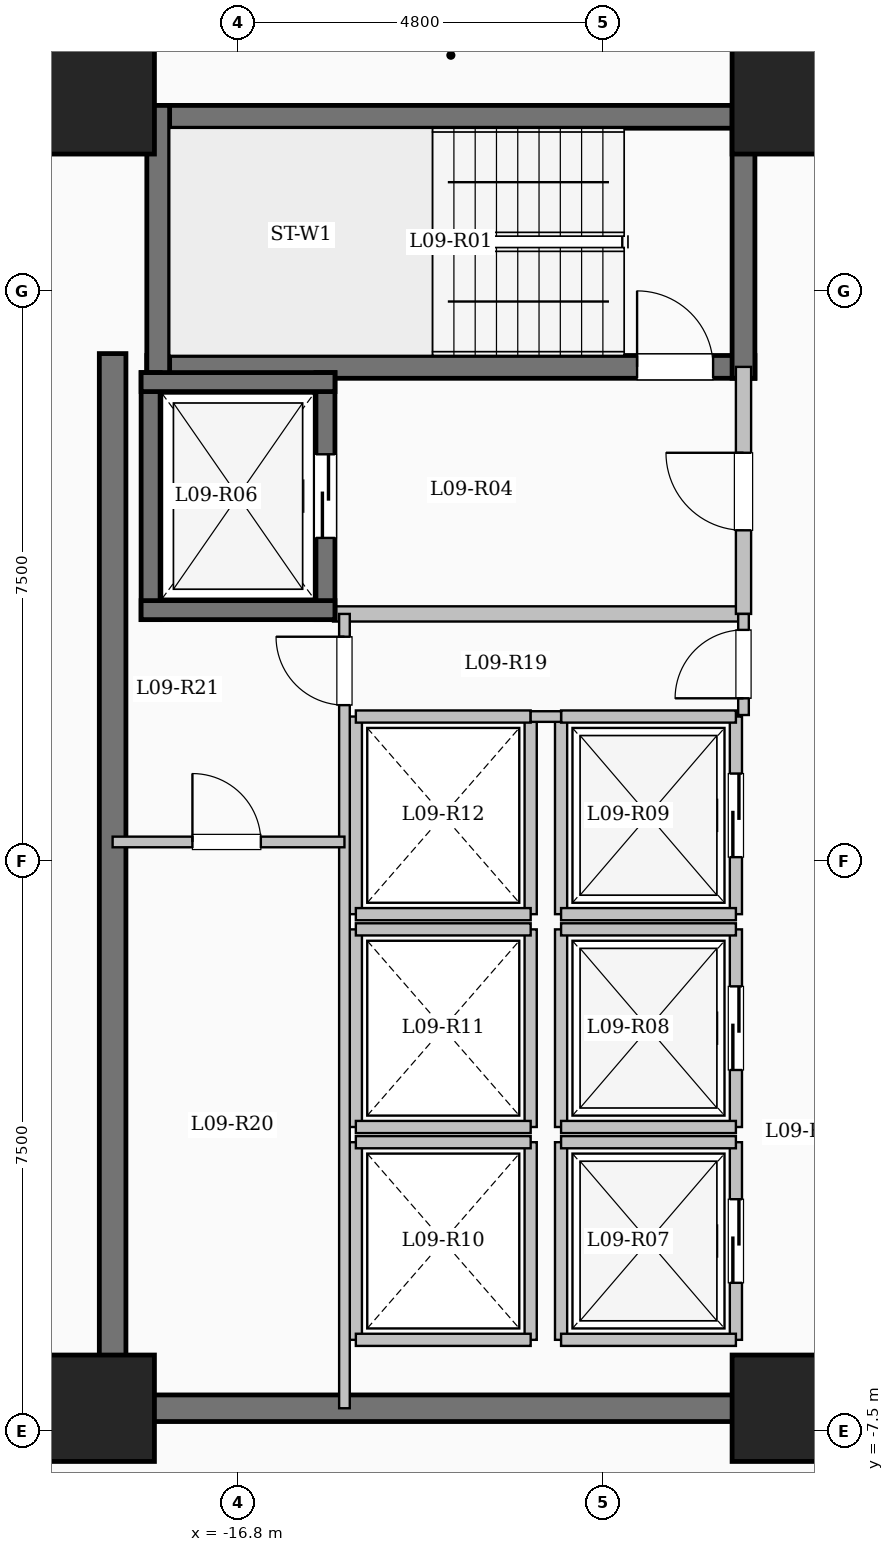
"""IFC4 building model, lengths in metres.
Left out: names, types, materials, properties, quantities, classifications, styles, units other than length and angle.
Written with IfcOpenShell. Run it as: python <this file> out.ifc"""

import sys

from ifc_helpers import new_model, si_unit, direction, frame, frame_2d, origin, origin_2d, place, context, subcontext, project, spatial, rectangle, extrude, element, fill, save


model = new_model("IFC4")
c1 = context("Model", 3, precision=1e-05, world=origin(), true_north=direction((0.0, 1.0)))
c2 = subcontext(c1, "Body", "Model", "MODEL_VIEW")
j1 = project(units=[si_unit("LENGTHUNIT", "METRE"), si_unit("PLANEANGLEUNIT", "RADIAN")], contexts=[c1])
p1 = place(None, origin())
s1 = spatial("IfcSite", under=j1, at=p1, CompositionType="ELEMENT")
p2 = place(p1, origin())
s2 = spatial("IfcBuilding", under=s1, at=p2, CompositionType="ELEMENT")
p3 = place(p2, frame((0.0, 0.0, 37.4)))
s3 = spatial("IfcBuildingStorey", under=s2, at=p3, CompositionType="ELEMENT", Elevation=37.4)
for number, where, z_axis, x_axis in (
    (1, (-9.6, -7.2, 0.0), (0.0, 0.0, 1.0), (1.0, 0.0, 0.0)),
    (2, (-9.6, 10.0, 0.0), (0.0, 0.0, 1.0), (1.0, 0.0, 0.0)),
    (3, (-18.6, -7.2, 0.0), (0.0, 0.0, 1.0), (1.0, 0.0, 0.0)),
    (4, (-18.6, 10.0, 0.0), (0.0, 0.0, 1.0), (1.0, 0.0, 0.0)),
):
    element("IfcColumn", number, at=place(p3, frame(where, z_axis=z_axis, x_axis=x_axis)), inside=s3, PredefinedType="COLUMN", context=c2, shape_type="SweptSolid", body=[
        extrude(rectangle(XDim=1.4, YDim=1.4, at=origin_2d()), origin(), (0.0, 0.0, 1.0), 3.35),
    ])
p4 = place(p3, frame((-18.0, 9.79, 0.0), z_axis=(0.0, 0.0, 1.0), x_axis=(1.0, 0.0, 0.0)))
e5 = element("IfcWall", 5, at=p4, inside=s3, PredefinedType="SHEAR", context=c2, shape_type="SweptSolid", body=[
    extrude(rectangle(XDim=8.0, YDim=0.3, at=frame_2d((4.0, 0.0))), origin(), (0.0, 0.0, 1.0), 3.35),
])
p5 = place(p3, frame((-18.0, 6.5, 0.0), z_axis=(0.0, 0.0, 1.0), x_axis=(1.0, 0.0, 0.0)))
e6 = element("IfcWall", 6, at=p5, inside=s3, PredefinedType="SHEAR", context=c2, shape_type="SweptSolid", body=[
    extrude(rectangle(XDim=8.0, YDim=0.3, at=frame_2d((4.0, 0.0))), origin(), (0.0, 0.0, 1.0), 3.35),
])
p6 = place(p5, frame((6.45, 0.0, 0.0)))
e7 = element("IfcOpeningElement", 7, at=p6, cuts=e6, PredefinedType="OPENING", context=c2, shape_type="SweptSolid", body=[
    extrude(rectangle(XDim=1.0, YDim=2.15, at=frame_2d((0.5, 1.075))), frame((0.0, 0.16, 0.0), z_axis=(0.0, -1.0, 0.0), x_axis=(1.0, 0.0, 0.0)), (0.0, 0.0, 1.0), 0.32),
])
for number, where, z_axis, x_axis in (
    (8, (-17.85, 6.35, 0.0), (0.0, 0.0, 1.0), (0.0, 1.0, 0.0)),
    (9, (-10.15, 6.35, 0.0), (0.0, 0.0, 1.0), (0.0, 1.0, 0.0)),
):
    element("IfcWall", number, at=place(p3, frame(where, z_axis=z_axis, x_axis=x_axis)), inside=s3, PredefinedType="SHEAR", context=c2, shape_type="SweptSolid", body=[
        extrude(rectangle(XDim=3.59, YDim=0.3, at=frame_2d((1.795, 0.0))), origin(), (0.0, 0.0, 1.0), 3.35),
    ])
p7 = place(p3, frame((-15.55, 3.25, 0.0), z_axis=(0.0, 0.0, 1.0), x_axis=(1.0, 0.0, 0.0)))
e10 = element("IfcWall", 10, at=p7, inside=s3, PredefinedType="SOLIDWALL", context=c2, shape_type="SweptSolid", body=[
    extrude(rectangle(XDim=5.4, YDim=0.2, at=frame_2d((2.7, 0.0))), origin(), (0.0, 0.0, 1.0), 3.1),
])
p8 = place(p3, frame((-10.15, 3.25, 0.0), z_axis=(0.0, 0.0, 1.0), x_axis=(0.0, 1.0, 0.0)))
e11 = element("IfcWall", 11, at=p8, inside=s3, PredefinedType="SOLIDWALL", context=c2, shape_type="SweptSolid", body=[
    extrude(rectangle(XDim=3.25, YDim=0.2, at=frame_2d((1.625, 0.0))), origin(), (0.0, 0.0, 1.0), 3.1),
])
p9 = place(p8, frame((1.1, 0.0, 0.0)))
e12 = element("IfcOpeningElement", 12, at=p9, cuts=e11, PredefinedType="OPENING", context=c2, shape_type="SweptSolid", body=[
    extrude(rectangle(XDim=1.02, YDim=2.15, at=frame_2d((0.51, 1.075))), frame((0.0, 0.11, 0.0), z_axis=(0.0, -1.0, 0.0), x_axis=(1.0, 0.0, 0.0)), (0.0, 0.0, 1.0), 0.22),
])
p10 = place(p3, frame((-17.95, 3.175, 0.0), z_axis=(0.0, 0.0, 1.0), x_axis=(0.0, 1.0, 0.0)))
e13 = element("IfcWall", 13, at=p10, inside=s3, PredefinedType="SHEAR", context=c2, shape_type="SweptSolid", body=[
    extrude(rectangle(XDim=3.25, YDim=0.25, at=frame_2d((1.625, 0.0))), origin(), (0.0, 0.0, 1.0), 3.35),
])
p11 = place(p3, frame((-15.65, 3.175, 0.0), z_axis=(0.0, 0.0, 1.0), x_axis=(0.0, 1.0, 0.0)))
e14 = element("IfcWall", 14, at=p11, inside=s3, PredefinedType="SHEAR", context=c2, shape_type="SweptSolid", body=[
    extrude(rectangle(XDim=3.25, YDim=0.25, at=frame_2d((1.625, 0.0))), origin(), (0.0, 0.0, 1.0), 3.35),
])
p12 = place(p11, frame((1.075, 0.0, 0.0)))
e15 = element("IfcOpeningElement", 15, at=p12, cuts=e14, PredefinedType="OPENING", context=c2, shape_type="SweptSolid", body=[
    extrude(rectangle(XDim=1.1, YDim=2.15, at=frame_2d((0.55, 1.075))), frame((0.0, 0.135, 0.0), z_axis=(0.0, -1.0, 0.0), x_axis=(1.0, 0.0, 0.0)), (0.0, 0.0, 1.0), 0.27),
])
for number, where, z_axis, x_axis in (
    (16, (-18.075, 3.3, 0.0), (0.0, 0.0, 1.0), (1.0, 0.0, 0.0)),
    (17, (-18.075, 6.3, 0.0), (0.0, 0.0, 1.0), (1.0, 0.0, 0.0)),
):
    element("IfcWall", number, at=place(p3, frame(where, z_axis=z_axis, x_axis=x_axis)), inside=s3, PredefinedType="SHEAR", context=c2, shape_type="SweptSolid", body=[
        extrude(rectangle(XDim=2.55, YDim=0.25, at=frame_2d((1.275, 0.0))), origin(), (0.0, 0.0, 1.0), 3.35),
    ])
p13 = place(p3, frame((-12.55, -6.3, 0.0), z_axis=(0.0, 0.0, 1.0), x_axis=(0.0, 1.0, 0.0)))
e18 = element("IfcWall", 18, at=p13, inside=s3, PredefinedType="SOLIDWALL", context=c2, shape_type="SweptSolid", body=[
    extrude(rectangle(XDim=2.6, YDim=0.16, at=frame_2d((1.3, 0.0))), origin(), (0.0, 0.0, 1.0), 3.1),
])
p14 = place(p3, frame((-10.25, -6.3, 0.0), z_axis=(0.0, 0.0, 1.0), x_axis=(0.0, 1.0, 0.0)))
e19 = element("IfcWall", 19, at=p14, inside=s3, PredefinedType="SOLIDWALL", context=c2, shape_type="SweptSolid", body=[
    extrude(rectangle(XDim=2.6, YDim=0.16, at=frame_2d((1.3, 0.0))), origin(), (0.0, 0.0, 1.0), 3.1),
])
p15 = place(p14, frame((0.75, 0.0, 0.0)))
e20 = element("IfcOpeningElement", 20, at=p15, cuts=e19, PredefinedType="OPENING", context=c2, shape_type="SweptSolid", body=[
    extrude(rectangle(XDim=1.1, YDim=2.15, at=frame_2d((0.55, 1.075))), frame((0.0, 0.09, 0.0), z_axis=(0.0, -1.0, 0.0), x_axis=(1.0, 0.0, 0.0)), (0.0, 0.0, 1.0), 0.18),
])
for number, where, z_axis, x_axis in (
    (21, (-12.55, -6.3, 0.0), (0.0, 0.0, 1.0), (1.0, 0.0, 0.0)),
    (22, (-12.55, -3.7, 0.0), (0.0, 0.0, 1.0), (1.0, 0.0, 0.0)),
):
    element("IfcWall", number, at=place(p3, frame(where, z_axis=z_axis, x_axis=x_axis)), inside=s3, PredefinedType="SOLIDWALL", context=c2, shape_type="SweptSolid", body=[
        extrude(rectangle(XDim=2.3, YDim=0.16, at=frame_2d((1.15, 0.0))), origin(), (0.0, 0.0, 1.0), 3.1),
    ])
p16 = place(p3, frame((-12.55, -3.5, 0.0), z_axis=(0.0, 0.0, 1.0), x_axis=(0.0, 1.0, 0.0)))
e23 = element("IfcWall", 23, at=p16, inside=s3, PredefinedType="SOLIDWALL", context=c2, shape_type="SweptSolid", body=[
    extrude(rectangle(XDim=2.6, YDim=0.16, at=frame_2d((1.3, 0.0))), origin(), (0.0, 0.0, 1.0), 3.1),
])
p17 = place(p3, frame((-10.25, -3.5, 0.0), z_axis=(0.0, 0.0, 1.0), x_axis=(0.0, 1.0, 0.0)))
e24 = element("IfcWall", 24, at=p17, inside=s3, PredefinedType="SOLIDWALL", context=c2, shape_type="SweptSolid", body=[
    extrude(rectangle(XDim=2.6, YDim=0.16, at=frame_2d((1.3, 0.0))), origin(), (0.0, 0.0, 1.0), 3.1),
])
p18 = place(p17, frame((0.75, 0.0, 0.0)))
e25 = element("IfcOpeningElement", 25, at=p18, cuts=e24, PredefinedType="OPENING", context=c2, shape_type="SweptSolid", body=[
    extrude(rectangle(XDim=1.1, YDim=2.15, at=frame_2d((0.55, 1.075))), frame((0.0, 0.09, 0.0), z_axis=(0.0, -1.0, 0.0), x_axis=(1.0, 0.0, 0.0)), (0.0, 0.0, 1.0), 0.18),
])
for number, where, z_axis, x_axis in (
    (26, (-12.55, -3.5, 0.0), (0.0, 0.0, 1.0), (1.0, 0.0, 0.0)),
    (27, (-12.55, -0.9, 0.0), (0.0, 0.0, 1.0), (1.0, 0.0, 0.0)),
):
    element("IfcWall", number, at=place(p3, frame(where, z_axis=z_axis, x_axis=x_axis)), inside=s3, PredefinedType="SOLIDWALL", context=c2, shape_type="SweptSolid", body=[
        extrude(rectangle(XDim=2.3, YDim=0.16, at=frame_2d((1.15, 0.0))), origin(), (0.0, 0.0, 1.0), 3.1),
    ])
p19 = place(p3, frame((-12.55, -0.7, 0.0), z_axis=(0.0, 0.0, 1.0), x_axis=(0.0, 1.0, 0.0)))
e28 = element("IfcWall", 28, at=p19, inside=s3, PredefinedType="SOLIDWALL", context=c2, shape_type="SweptSolid", body=[
    extrude(rectangle(XDim=2.6, YDim=0.16, at=frame_2d((1.3, 0.0))), origin(), (0.0, 0.0, 1.0), 3.1),
])
p20 = place(p3, frame((-10.25, -0.7, 0.0), z_axis=(0.0, 0.0, 1.0), x_axis=(0.0, 1.0, 0.0)))
e29 = element("IfcWall", 29, at=p20, inside=s3, PredefinedType="SOLIDWALL", context=c2, shape_type="SweptSolid", body=[
    extrude(rectangle(XDim=2.6, YDim=0.16, at=frame_2d((1.3, 0.0))), origin(), (0.0, 0.0, 1.0), 3.1),
])
p21 = place(p20, frame((0.75, 0.0, 0.0)))
e30 = element("IfcOpeningElement", 30, at=p21, cuts=e29, PredefinedType="OPENING", context=c2, shape_type="SweptSolid", body=[
    extrude(rectangle(XDim=1.1, YDim=2.15, at=frame_2d((0.55, 1.075))), frame((0.0, 0.09, 0.0), z_axis=(0.0, -1.0, 0.0), x_axis=(1.0, 0.0, 0.0)), (0.0, 0.0, 1.0), 0.18),
])
for number, where, z_axis, x_axis in (
    (31, (-12.55, -0.7, 0.0), (0.0, 0.0, 1.0), (1.0, 0.0, 0.0)),
    (32, (-12.55, 1.9, 0.0), (0.0, 0.0, 1.0), (1.0, 0.0, 0.0)),
):
    element("IfcWall", number, at=place(p3, frame(where, z_axis=z_axis, x_axis=x_axis)), inside=s3, PredefinedType="SOLIDWALL", context=c2, shape_type="SweptSolid", body=[
        extrude(rectangle(XDim=2.3, YDim=0.16, at=frame_2d((1.15, 0.0))), origin(), (0.0, 0.0, 1.0), 3.1),
    ])
for number, where, z_axis, x_axis in (
    (33, (-15.25, -6.3, 0.0), (0.0, 0.0, 1.0), (0.0, 1.0, 0.0)),
    (34, (-12.95, -6.3, 0.0), (0.0, 0.0, 1.0), (0.0, 1.0, 0.0)),
):
    element("IfcWall", number, at=place(p3, frame(where, z_axis=z_axis, x_axis=x_axis)), inside=s3, PredefinedType="SOLIDWALL", context=c2, shape_type="SweptSolid", body=[
        extrude(rectangle(XDim=2.6, YDim=0.16, at=frame_2d((1.3, 0.0))), origin(), (0.0, 0.0, 1.0), 3.1),
    ])
for number, where, z_axis, x_axis in (
    (35, (-15.25, -6.3, 0.0), (0.0, 0.0, 1.0), (1.0, 0.0, 0.0)),
    (36, (-15.25, -3.7, 0.0), (0.0, 0.0, 1.0), (1.0, 0.0, 0.0)),
):
    element("IfcWall", number, at=place(p3, frame(where, z_axis=z_axis, x_axis=x_axis)), inside=s3, PredefinedType="SOLIDWALL", context=c2, shape_type="SweptSolid", body=[
        extrude(rectangle(XDim=2.3, YDim=0.16, at=frame_2d((1.15, 0.0))), origin(), (0.0, 0.0, 1.0), 3.1),
    ])
for number, where, z_axis, x_axis in (
    (37, (-15.25, -3.5, 0.0), (0.0, 0.0, 1.0), (0.0, 1.0, 0.0)),
    (38, (-12.95, -3.5, 0.0), (0.0, 0.0, 1.0), (0.0, 1.0, 0.0)),
):
    element("IfcWall", number, at=place(p3, frame(where, z_axis=z_axis, x_axis=x_axis)), inside=s3, PredefinedType="SOLIDWALL", context=c2, shape_type="SweptSolid", body=[
        extrude(rectangle(XDim=2.6, YDim=0.16, at=frame_2d((1.3, 0.0))), origin(), (0.0, 0.0, 1.0), 3.1),
    ])
for number, where, z_axis, x_axis in (
    (39, (-15.25, -3.5, 0.0), (0.0, 0.0, 1.0), (1.0, 0.0, 0.0)),
    (40, (-15.25, -0.9, 0.0), (0.0, 0.0, 1.0), (1.0, 0.0, 0.0)),
):
    element("IfcWall", number, at=place(p3, frame(where, z_axis=z_axis, x_axis=x_axis)), inside=s3, PredefinedType="SOLIDWALL", context=c2, shape_type="SweptSolid", body=[
        extrude(rectangle(XDim=2.3, YDim=0.16, at=frame_2d((1.15, 0.0))), origin(), (0.0, 0.0, 1.0), 3.1),
    ])
for number, where, z_axis, x_axis in (
    (41, (-15.25, -0.7, 0.0), (0.0, 0.0, 1.0), (0.0, 1.0, 0.0)),
    (42, (-12.95, -0.7, 0.0), (0.0, 0.0, 1.0), (0.0, 1.0, 0.0)),
):
    element("IfcWall", number, at=place(p3, frame(where, z_axis=z_axis, x_axis=x_axis)), inside=s3, PredefinedType="SOLIDWALL", context=c2, shape_type="SweptSolid", body=[
        extrude(rectangle(XDim=2.6, YDim=0.16, at=frame_2d((1.3, 0.0))), origin(), (0.0, 0.0, 1.0), 3.1),
    ])
for number, where, z_axis, x_axis in (
    (43, (-15.25, -0.7, 0.0), (0.0, 0.0, 1.0), (1.0, 0.0, 0.0)),
    (44, (-15.25, 1.9, 0.0), (0.0, 0.0, 1.0), (1.0, 0.0, 0.0)),
):
    element("IfcWall", number, at=place(p3, frame(where, z_axis=z_axis, x_axis=x_axis)), inside=s3, PredefinedType="SOLIDWALL", context=c2, shape_type="SweptSolid", body=[
        extrude(rectangle(XDim=2.3, YDim=0.16, at=frame_2d((1.15, 0.0))), origin(), (0.0, 0.0, 1.0), 3.1),
    ])
p22 = place(p3, frame((-18.45, -7.375, 0.0), z_axis=(0.0, 0.0, 1.0), x_axis=(0.0, 1.0, 0.0)))
e45 = element("IfcWall", 45, at=p22, inside=s3, PredefinedType="SHEAR", context=c2, shape_type="SweptSolid", body=[
    extrude(rectangle(XDim=14.05, YDim=0.35, at=frame_2d((7.025, 0.0))), origin(), (0.0, 0.0, 1.0), 3.35),
])
p23 = place(p3, frame((-18.625, -7.2, 0.0), z_axis=(0.0, 0.0, 1.0), x_axis=(1.0, 0.0, 0.0)))
e46 = element("IfcWall", 46, at=p23, inside=s3, PredefinedType="SHEAR", context=c2, shape_type="SweptSolid", body=[
    extrude(rectangle(XDim=8.55, YDim=0.35, at=frame_2d((4.275, 0.0))), origin(), (0.0, 0.0, 1.0), 3.35),
])
p24 = place(p3, frame((-12.95, 1.9, 0.0), z_axis=(0.0, 0.0, 1.0), x_axis=(1.0, 0.0, 0.0)))
e47 = element("IfcWall", 47, at=p24, inside=s3, PredefinedType="PARTITIONING", context=c2, shape_type="SweptSolid", body=[
    extrude(rectangle(XDim=0.4, YDim=0.14, at=frame_2d((0.2, 0.0))), origin(), (0.0, 0.0, 1.0), 3.1),
])
p25 = place(p3, frame((-10.15, 1.92, 0.0), z_axis=(0.0, 0.0, 1.0), x_axis=(0.0, 1.0, 0.0)))
e48 = element("IfcWall", 48, at=p25, inside=s3, PredefinedType="PARTITIONING", context=c2, shape_type="SweptSolid", body=[
    extrude(rectangle(XDim=1.33, YDim=0.14, at=frame_2d((0.665, 0.0))), origin(), (0.0, 0.0, 1.0), 3.1),
])
p26 = place(p25, frame((0.22, 0.0, 0.0)))
e49 = element("IfcOpeningElement", 49, at=p26, cuts=e48, PredefinedType="OPENING", context=c2, shape_type="SweptSolid", body=[
    extrude(rectangle(XDim=0.9, YDim=2.08, at=frame_2d((0.45, 1.04))), frame((0.0, 0.08, 0.0), z_axis=(0.0, -1.0, 0.0), x_axis=(1.0, 0.0, 0.0)), (0.0, 0.0, 1.0), 0.16),
])
p27 = place(p3, frame((-15.4, -7.2, 0.0), z_axis=(0.0, 0.0, 1.0), x_axis=(0.0, 1.0, 0.0)))
e50 = element("IfcWall", 50, at=p27, inside=s3, PredefinedType="PARTITIONING", context=c2, shape_type="SweptSolid", body=[
    extrude(rectangle(XDim=10.45, YDim=0.14, at=frame_2d((5.225, 0.0))), origin(), (0.0, 0.0, 1.0), 3.1),
])
p28 = place(p27, frame((9.25, 0.0, 0.0)))
e51 = element("IfcOpeningElement", 51, at=p28, cuts=e50, PredefinedType="OPENING", context=c2, shape_type="SweptSolid", body=[
    extrude(rectangle(XDim=0.9, YDim=2.08, at=frame_2d((0.45, 1.04))), frame((0.0, 0.08, 0.0), z_axis=(0.0, -1.0, 0.0), x_axis=(1.0, 0.0, 0.0)), (0.0, 0.0, 1.0), 0.16),
])
p29 = place(p3, frame((-18.45, 0.25, 0.0), z_axis=(0.0, 0.0, 1.0), x_axis=(1.0, 0.0, 0.0)))
e52 = element("IfcWall", 52, at=p29, inside=s3, PredefinedType="PARTITIONING", context=c2, shape_type="SweptSolid", body=[
    extrude(rectangle(XDim=3.05, YDim=0.14, at=frame_2d((1.525, 0.0))), origin(), (0.0, 0.0, 1.0), 3.1),
])
p30 = place(p29, frame((1.05, 0.0, 0.0)))
e53 = element("IfcOpeningElement", 53, at=p30, cuts=e52, PredefinedType="OPENING", context=c2, shape_type="SweptSolid", body=[
    extrude(rectangle(XDim=0.9, YDim=2.08, at=frame_2d((0.45, 1.04))), frame((0.0, 0.08, 0.0), z_axis=(0.0, -1.0, 0.0), x_axis=(1.0, 0.0, 0.0)), (0.0, 0.0, 1.0), 0.16),
])
p31 = place(p3, frame((-28.68, -7.25, 0.0), z_axis=(0.0, 0.0, 1.0), x_axis=(1.0, 0.0, 0.0)))
e54 = element("IfcWall", 54, at=p31, inside=s3, PredefinedType="PARTITIONING", context=c2, shape_type="SweptSolid", body=[
    extrude(rectangle(XDim=10.23, YDim=0.15, at=frame_2d((5.115, 0.0))), origin(), (0.0, 0.0, 1.0), 3.1),
])
p32 = place(p31, frame((7.03, 0.0, 0.0)))
e55 = element("IfcOpeningElement", 55, at=p32, cuts=e54, PredefinedType="OPENING", context=c2, shape_type="SweptSolid", body=[
    extrude(rectangle(XDim=1.08, YDim=2.15, at=frame_2d((0.54, 1.075))), frame((0.0, 0.085, 0.0), z_axis=(0.0, -1.0, 0.0), x_axis=(1.0, 0.0, 0.0)), (0.0, 0.0, 1.0), 0.17),
])
p33 = place(p6, origin())
e56 = element("IfcDoor", 56, at=p33, inside=s3, OperationType="SINGLE_SWING_LEFT", PredefinedType="DOOR", context=c2, shape_type="SweptSolid", body=[
    extrude(rectangle(XDim=1.0, YDim=2.15, at=frame_2d((0.5, 1.075))), frame((0.0, 0.025, 0.0), z_axis=(0.0, -1.0, 0.0), x_axis=(1.0, 0.0, 0.0)), (0.0, 0.0, 1.0), 0.05),
])
fill(e7, e56)
p34 = place(p9, origin())
e57 = element("IfcDoor", 57, at=p34, inside=s3, OperationType="SINGLE_SWING_RIGHT", PredefinedType="DOOR", context=c2, shape_type="SweptSolid", body=[
    extrude(rectangle(XDim=1.02, YDim=2.15, at=frame_2d((0.51, 1.075))), frame((0.0, 0.025, 0.0), z_axis=(0.0, -1.0, 0.0), x_axis=(1.0, 0.0, 0.0)), (0.0, 0.0, 1.0), 0.05),
])
fill(e12, e57)
p35 = place(p12, origin())
e58 = element("IfcDoor", 58, at=p35, inside=s3, OperationType="SLIDING_TO_LEFT", PredefinedType="DOOR", context=c2, shape_type="SweptSolid", body=[
    extrude(rectangle(XDim=1.1, YDim=2.15, at=frame_2d((0.55, 1.075))), frame((0.0, 0.025, 0.0), z_axis=(0.0, -1.0, 0.0), x_axis=(1.0, 0.0, 0.0)), (0.0, 0.0, 1.0), 0.05),
])
fill(e15, e58)
p36 = place(p15, origin())
e59 = element("IfcDoor", 59, at=p36, inside=s3, OperationType="SLIDING_TO_LEFT", PredefinedType="DOOR", context=c2, shape_type="SweptSolid", body=[
    extrude(rectangle(XDim=1.1, YDim=2.15, at=frame_2d((0.55, 1.075))), frame((0.0, 0.025, 0.0), z_axis=(0.0, -1.0, 0.0), x_axis=(1.0, 0.0, 0.0)), (0.0, 0.0, 1.0), 0.05),
])
fill(e20, e59)
p37 = place(p18, origin())
e60 = element("IfcDoor", 60, at=p37, inside=s3, OperationType="SLIDING_TO_LEFT", PredefinedType="DOOR", context=c2, shape_type="SweptSolid", body=[
    extrude(rectangle(XDim=1.1, YDim=2.15, at=frame_2d((0.55, 1.075))), frame((0.0, 0.025, 0.0), z_axis=(0.0, -1.0, 0.0), x_axis=(1.0, 0.0, 0.0)), (0.0, 0.0, 1.0), 0.05),
])
fill(e25, e60)
p38 = place(p21, origin())
e61 = element("IfcDoor", 61, at=p38, inside=s3, OperationType="SLIDING_TO_LEFT", PredefinedType="DOOR", context=c2, shape_type="SweptSolid", body=[
    extrude(rectangle(XDim=1.1, YDim=2.15, at=frame_2d((0.55, 1.075))), frame((0.0, 0.025, 0.0), z_axis=(0.0, -1.0, 0.0), x_axis=(1.0, 0.0, 0.0)), (0.0, 0.0, 1.0), 0.05),
])
fill(e30, e61)
p39 = place(p26, origin())
e62 = element("IfcDoor", 62, at=p39, inside=s3, OperationType="SINGLE_SWING_LEFT", PredefinedType="DOOR", context=c2, shape_type="SweptSolid", body=[
    extrude(rectangle(XDim=0.9, YDim=2.08, at=frame_2d((0.45, 1.04))), frame((0.0, 0.025, 0.0), z_axis=(0.0, -1.0, 0.0), x_axis=(1.0, 0.0, 0.0)), (0.0, 0.0, 1.0), 0.05),
])
fill(e49, e62)
p40 = place(p28, origin())
e63 = element("IfcDoor", 63, at=p40, inside=s3, OperationType="SINGLE_SWING_RIGHT", PredefinedType="DOOR", context=c2, shape_type="SweptSolid", body=[
    extrude(rectangle(XDim=0.9, YDim=2.08, at=frame_2d((0.45, 1.04))), frame((0.0, 0.025, 0.0), z_axis=(0.0, -1.0, 0.0), x_axis=(1.0, 0.0, 0.0)), (0.0, 0.0, 1.0), 0.05),
])
fill(e51, e63)
p41 = place(p30, origin())
e64 = element("IfcDoor", 64, at=p41, inside=s3, OperationType="SINGLE_SWING_LEFT", PredefinedType="DOOR", context=c2, shape_type="SweptSolid", body=[
    extrude(rectangle(XDim=0.9, YDim=2.08, at=frame_2d((0.45, 1.04))), frame((0.0, 0.025, 0.0), z_axis=(0.0, -1.0, 0.0), x_axis=(1.0, 0.0, 0.0)), (0.0, 0.0, 1.0), 0.05),
])
fill(e53, e64)
save(model, sys.argv[1])
